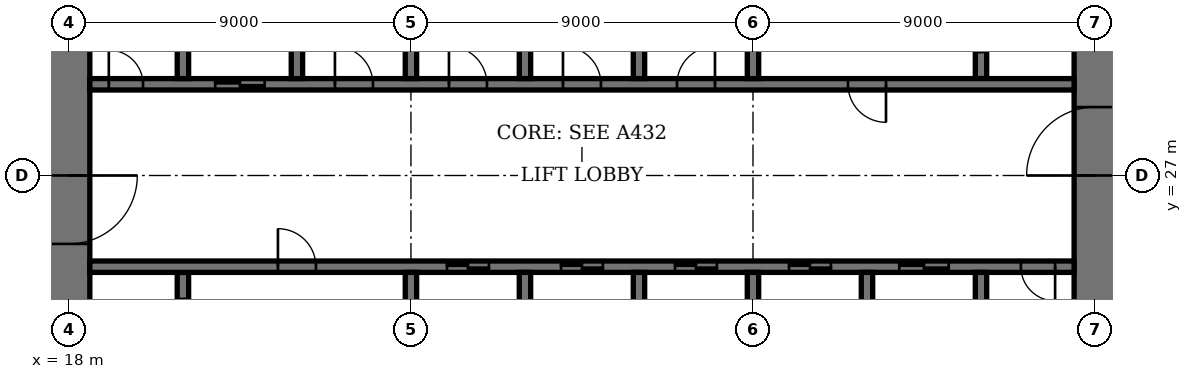
"""IFC4 building model, lengths in metres.
Left out: names, types, materials, properties, quantities, classifications, styles, units other than length and angle.
Written with IfcOpenShell. Run it as: python <this file> out.ifc"""

import sys

from ifc_helpers import new_model, si_unit, direction, frame, frame_2d, origin, place, context, subcontext, project, spatial, rectangle, extrude, element, fill, save


model = new_model("IFC4")
c1 = context("Model", 3, precision=1e-05, world=origin(), true_north=direction((0.0, 1.0)))
c2 = subcontext(c1, "Body", "Model", "MODEL_VIEW")
j1 = project(units=[si_unit("LENGTHUNIT", "METRE"), si_unit("PLANEANGLEUNIT", "RADIAN")], contexts=[c1])
p1 = place(None, origin())
s1 = spatial("IfcSite", under=j1, at=p1, CompositionType="ELEMENT")
p2 = place(p1, origin())
s2 = spatial("IfcBuilding", under=s1, at=p2, CompositionType="ELEMENT")
p3 = place(p2, frame((0.0, 0.0, 283.4)))
s3 = spatial("IfcBuildingStorey", under=s2, at=p3, CompositionType="ELEMENT", Elevation=283.4)
p4 = place(p3, frame((18.0, 35.45, 0.0), z_axis=(0.0, 0.0, 1.0), x_axis=(0.0, -1.0, 0.0)))
e1 = element("IfcWall", 1, at=p4, inside=s3, PredefinedType="SHEAR", context=c2, shape_type="SweptSolid", body=[
    extrude(rectangle(XDim=16.9, YDim=1.1, at=frame_2d((8.45, 0.0))), origin(), (0.0, 0.0, 1.0), 4.0),
])
p5 = place(p4, frame((8.45, 0.0, 0.0)))
e2 = element("IfcOpeningElement", 2, at=p5, cuts=e1, PredefinedType="OPENING", context=c2, shape_type="SweptSolid", body=[
    extrude(rectangle(XDim=1.8, YDim=2.4, at=frame_2d((0.9, 1.2))), frame((0.0, 0.56, 0.0), z_axis=(0.0, -1.0, 0.0), x_axis=(1.0, 0.0, 0.0)), (0.0, 0.0, 1.0), 1.12),
])
p6 = place(p3, frame((45.0, 18.55, 0.0), z_axis=(0.0, 0.0, 1.0), x_axis=(0.0, 1.0, 0.0)))
e3 = element("IfcWall", 3, at=p6, inside=s3, PredefinedType="SHEAR", context=c2, shape_type="SweptSolid", body=[
    extrude(rectangle(XDim=16.9, YDim=1.1, at=frame_2d((8.45, 0.0))), origin(), (0.0, 0.0, 1.0), 4.0),
])
p7 = place(p6, frame((8.45, 0.0, 0.0)))
e4 = element("IfcOpeningElement", 4, at=p7, cuts=e3, PredefinedType="OPENING", context=c2, shape_type="SweptSolid", body=[
    extrude(rectangle(XDim=1.8, YDim=2.4, at=frame_2d((0.9, 1.2))), frame((0.0, 0.56, 0.0), z_axis=(0.0, -1.0, 0.0), x_axis=(1.0, 0.0, 0.0)), (0.0, 0.0, 1.0), 1.12),
])
p8 = place(p3, frame((21.0, 21.95, 0.0), z_axis=(0.0, 0.0, 1.0), x_axis=(0.0, 1.0, 0.0)))
e5 = element("IfcWall", 5, at=p8, inside=s3, PredefinedType="SHEAR", context=c2, shape_type="SweptSolid", body=[
    extrude(rectangle(XDim=2.5, YDim=0.3, at=frame_2d((1.25, 0.0))), origin(), (0.0, 0.0, 1.0), 4.0),
])
p9 = place(p8, frame((0.7, 0.0, 0.0)))
e6 = element("IfcOpeningElement", 6, at=p9, cuts=e5, PredefinedType="OPENING", context=c2, shape_type="SweptSolid", body=[
    extrude(rectangle(XDim=1.1, YDim=2.4, at=frame_2d((0.55, 1.2))), frame((0.0, 0.16, 0.0), z_axis=(0.0, -1.0, 0.0), x_axis=(1.0, 0.0, 0.0)), (0.0, 0.0, 1.0), 0.32),
])
p10 = place(p3, frame((42.0, 29.55, 0.0), z_axis=(0.0, 0.0, 1.0), x_axis=(0.0, 1.0, 0.0)))
e7 = element("IfcWall", 7, at=p10, inside=s3, PredefinedType="SHEAR", context=c2, shape_type="SweptSolid", body=[
    extrude(rectangle(XDim=2.5, YDim=0.3, at=frame_2d((1.25, 0.0))), origin(), (0.0, 0.0, 1.0), 4.0),
])
p11 = place(p10, frame((0.7, 0.0, 0.0)))
e8 = element("IfcOpeningElement", 8, at=p11, cuts=e7, PredefinedType="OPENING", context=c2, shape_type="SweptSolid", body=[
    extrude(rectangle(XDim=1.1, YDim=2.4, at=frame_2d((0.55, 1.2))), frame((0.0, 0.16, 0.0), z_axis=(0.0, -1.0, 0.0), x_axis=(1.0, 0.0, 0.0)), (0.0, 0.0, 1.0), 0.32),
])
p12 = place(p3, frame((18.55, 24.6, 0.0), z_axis=(0.0, 0.0, 1.0), x_axis=(1.0, 0.0, 0.0)))
e9 = element("IfcWall", 9, at=p12, inside=s3, PredefinedType="SHEAR", context=c2, shape_type="SweptSolid", body=[
    extrude(rectangle(XDim=25.9, YDim=0.3, at=frame_2d((12.95, 0.0))), origin(), (0.0, 0.0, 1.0), 4.0),
])
p13 = place(p12, frame((4.95, 0.0, 0.0)))
e10 = element("IfcOpeningElement", 10, at=p13, cuts=e9, PredefinedType="OPENING", context=c2, shape_type="SweptSolid", body=[
    extrude(rectangle(XDim=1.0, YDim=2.4, at=frame_2d((0.5, 1.2))), frame((0.0, 0.16, 0.0), z_axis=(0.0, -1.0, 0.0), x_axis=(1.0, 0.0, 0.0)), (0.0, 0.0, 1.0), 0.32),
])
p14 = place(p12, frame((24.5, 0.0, 0.0)))
e11 = element("IfcOpeningElement", 11, at=p14, cuts=e9, PredefinedType="OPENING", context=c2, shape_type="SweptSolid", body=[
    extrude(rectangle(XDim=0.9, YDim=2.1, at=frame_2d((0.45, 1.05))), frame((0.0, 0.16, 0.0), z_axis=(0.0, -1.0, 0.0), x_axis=(1.0, 0.0, 0.0)), (0.0, 0.0, 1.0), 0.32),
])
p15 = place(p12, frame((9.4, 0.0, 0.0)))
e12 = element("IfcOpeningElement", 12, at=p15, cuts=e9, PredefinedType="OPENING", context=c2, shape_type="SweptSolid", body=[
    extrude(rectangle(XDim=1.1, YDim=2.4, at=frame_2d((0.55, 1.2))), frame((0.0, 0.16, 0.0), z_axis=(0.0, -1.0, 0.0), x_axis=(1.0, 0.0, 0.0)), (0.0, 0.0, 1.0), 0.32),
])
p16 = place(p12, frame((12.4, 0.0, 0.0)))
e13 = element("IfcOpeningElement", 13, at=p16, cuts=e9, PredefinedType="OPENING", context=c2, shape_type="SweptSolid", body=[
    extrude(rectangle(XDim=1.1, YDim=2.4, at=frame_2d((0.55, 1.2))), frame((0.0, 0.16, 0.0), z_axis=(0.0, -1.0, 0.0), x_axis=(1.0, 0.0, 0.0)), (0.0, 0.0, 1.0), 0.32),
])
p17 = place(p12, frame((15.4, 0.0, 0.0)))
e14 = element("IfcOpeningElement", 14, at=p17, cuts=e9, PredefinedType="OPENING", context=c2, shape_type="SweptSolid", body=[
    extrude(rectangle(XDim=1.1, YDim=2.4, at=frame_2d((0.55, 1.2))), frame((0.0, 0.16, 0.0), z_axis=(0.0, -1.0, 0.0), x_axis=(1.0, 0.0, 0.0)), (0.0, 0.0, 1.0), 0.32),
])
p18 = place(p12, frame((18.4, 0.0, 0.0)))
e15 = element("IfcOpeningElement", 15, at=p18, cuts=e9, PredefinedType="OPENING", context=c2, shape_type="SweptSolid", body=[
    extrude(rectangle(XDim=1.1, YDim=2.4, at=frame_2d((0.55, 1.2))), frame((0.0, 0.16, 0.0), z_axis=(0.0, -1.0, 0.0), x_axis=(1.0, 0.0, 0.0)), (0.0, 0.0, 1.0), 0.32),
])
p19 = place(p12, frame((21.3, 0.0, 0.0)))
e16 = element("IfcOpeningElement", 16, at=p19, cuts=e9, PredefinedType="OPENING", context=c2, shape_type="SweptSolid", body=[
    extrude(rectangle(XDim=1.3, YDim=2.4, at=frame_2d((0.65, 1.2))), frame((0.0, 0.16, 0.0), z_axis=(0.0, -1.0, 0.0), x_axis=(1.0, 0.0, 0.0)), (0.0, 0.0, 1.0), 0.32),
])
p20 = place(p3, frame((18.55, 29.4, 0.0), z_axis=(0.0, 0.0, 1.0), x_axis=(1.0, 0.0, 0.0)))
e17 = element("IfcWall", 17, at=p20, inside=s3, PredefinedType="SHEAR", context=c2, shape_type="SweptSolid", body=[
    extrude(rectangle(XDim=25.9, YDim=0.3, at=frame_2d((12.95, 0.0))), origin(), (0.0, 0.0, 1.0), 4.0),
])
p21 = place(p20, frame((19.95, 0.0, 0.0)))
e18 = element("IfcOpeningElement", 18, at=p21, cuts=e17, PredefinedType="OPENING", context=c2, shape_type="SweptSolid", body=[
    extrude(rectangle(XDim=1.0, YDim=2.4, at=frame_2d((0.5, 1.2))), frame((0.0, 0.16, 0.0), z_axis=(0.0, -1.0, 0.0), x_axis=(1.0, 0.0, 0.0)), (0.0, 0.0, 1.0), 0.32),
])
p22 = place(p20, frame((0.5, 0.0, 0.0)))
e19 = element("IfcOpeningElement", 19, at=p22, cuts=e17, PredefinedType="OPENING", context=c2, shape_type="SweptSolid", body=[
    extrude(rectangle(XDim=0.9, YDim=2.1, at=frame_2d((0.45, 1.05))), frame((0.0, 0.16, 0.0), z_axis=(0.0, -1.0, 0.0), x_axis=(1.0, 0.0, 0.0)), (0.0, 0.0, 1.0), 0.32),
])
p23 = place(p20, frame((15.45, 0.0, 0.0)))
e20 = element("IfcOpeningElement", 20, at=p23, cuts=e17, PredefinedType="OPENING", context=c2, shape_type="SweptSolid", body=[
    extrude(rectangle(XDim=1.0, YDim=2.4, at=frame_2d((0.5, 1.2))), frame((0.0, 0.16, 0.0), z_axis=(0.0, -1.0, 0.0), x_axis=(1.0, 0.0, 0.0)), (0.0, 0.0, 1.0), 0.32),
])
p24 = place(p20, frame((12.45, 0.0, 0.0)))
e21 = element("IfcOpeningElement", 21, at=p24, cuts=e17, PredefinedType="OPENING", context=c2, shape_type="SweptSolid", body=[
    extrude(rectangle(XDim=1.0, YDim=2.4, at=frame_2d((0.5, 1.2))), frame((0.0, 0.16, 0.0), z_axis=(0.0, -1.0, 0.0), x_axis=(1.0, 0.0, 0.0)), (0.0, 0.0, 1.0), 0.32),
])
p25 = place(p20, frame((9.45, 0.0, 0.0)))
e22 = element("IfcOpeningElement", 22, at=p25, cuts=e17, PredefinedType="OPENING", context=c2, shape_type="SweptSolid", body=[
    extrude(rectangle(XDim=1.0, YDim=2.4, at=frame_2d((0.5, 1.2))), frame((0.0, 0.16, 0.0), z_axis=(0.0, -1.0, 0.0), x_axis=(1.0, 0.0, 0.0)), (0.0, 0.0, 1.0), 0.32),
])
p26 = place(p20, frame((6.45, 0.0, 0.0)))
e23 = element("IfcOpeningElement", 23, at=p26, cuts=e17, PredefinedType="OPENING", context=c2, shape_type="SweptSolid", body=[
    extrude(rectangle(XDim=1.0, YDim=2.4, at=frame_2d((0.5, 1.2))), frame((0.0, 0.16, 0.0), z_axis=(0.0, -1.0, 0.0), x_axis=(1.0, 0.0, 0.0)), (0.0, 0.0, 1.0), 0.32),
])
p27 = place(p20, frame((3.3, 0.0, 0.0)))
e24 = element("IfcOpeningElement", 24, at=p27, cuts=e17, PredefinedType="OPENING", context=c2, shape_type="SweptSolid", body=[
    extrude(rectangle(XDim=1.3, YDim=2.4, at=frame_2d((0.65, 1.2))), frame((0.0, 0.16, 0.0), z_axis=(0.0, -1.0, 0.0), x_axis=(1.0, 0.0, 0.0)), (0.0, 0.0, 1.0), 0.32),
])
for number, where, z_axis, x_axis in (
    (25, (30.0, 21.75, 0.0), (0.0, 0.0, 1.0), (0.0, 1.0, 0.0)),
    (26, (33.0, 29.55, 0.0), (0.0, 0.0, 1.0), (0.0, 1.0, 0.0)),
    (27, (33.0, 21.75, 0.0), (0.0, 0.0, 1.0), (0.0, 1.0, 0.0)),
    (28, (30.0, 29.55, 0.0), (0.0, 0.0, 1.0), (0.0, 1.0, 0.0)),
    (29, (36.0, 21.75, 0.0), (0.0, 0.0, 1.0), (0.0, 1.0, 0.0)),
    (30, (27.0, 29.55, 0.0), (0.0, 0.0, 1.0), (0.0, 1.0, 0.0)),
):
    element("IfcWall", number, at=place(p3, frame(where, z_axis=z_axis, x_axis=x_axis)), inside=s3, PredefinedType="SHEAR", context=c2, shape_type="SweptSolid", body=[
        extrude(rectangle(XDim=2.7, YDim=0.3, at=frame_2d((1.35, 0.0))), origin(), (0.0, 0.0, 1.0), 4.0),
    ])
for number, where, z_axis, x_axis in (
    (31, (39.0, 18.55, 0.0), (0.0, 0.0, 1.0), (0.0, 1.0, 0.0)),
    (32, (24.0, 29.55, 0.0), (0.0, 0.0, 1.0), (0.0, 1.0, 0.0)),
):
    element("IfcWall", number, at=place(p3, frame(where, z_axis=z_axis, x_axis=x_axis)), inside=s3, PredefinedType="SHEAR", context=c2, shape_type="SweptSolid", body=[
        extrude(rectangle(XDim=5.9, YDim=0.3, at=frame_2d((2.95, 0.0))), origin(), (0.0, 0.0, 1.0), 4.0),
    ])
for number, where, z_axis, x_axis in (
    (33, (42.0, 21.75, 0.0), (0.0, 0.0, 1.0), (0.0, 1.0, 0.0)),
    (34, (21.0, 29.55, 0.0), (0.0, 0.0, 1.0), (0.0, 1.0, 0.0)),
):
    element("IfcWall", number, at=place(p3, frame(where, z_axis=z_axis, x_axis=x_axis)), inside=s3, PredefinedType="SHEAR", context=c2, shape_type="SweptSolid", body=[
        extrude(rectangle(XDim=2.7, YDim=0.3, at=frame_2d((1.35, 0.0))), origin(), (0.0, 0.0, 1.0), 4.0),
    ])
for number, where, z_axis, x_axis in (
    (35, (27.0, 21.6, 0.0), (0.0, 0.0, 1.0), (0.0, 1.0, 0.0)),
    (36, (36.0, 29.55, 0.0), (0.0, 0.0, 1.0), (0.0, 1.0, 0.0)),
):
    element("IfcWall", number, at=place(p3, frame(where, z_axis=z_axis, x_axis=x_axis)), inside=s3, PredefinedType="SHEAR", context=c2, shape_type="SweptSolid", body=[
        extrude(rectangle(XDim=2.85, YDim=0.3, at=frame_2d((1.425, 0.0))), origin(), (0.0, 0.0, 1.0), 4.0),
    ])
p28 = place(p5, origin())
e37 = element("IfcDoor", 37, at=p28, inside=s3, OperationType="DOUBLE_DOOR_DOUBLE_SWING", PredefinedType="DOOR", context=c2, shape_type="SweptSolid", body=[
    extrude(rectangle(XDim=1.8, YDim=2.4, at=frame_2d((0.9, 1.2))), frame((0.0, 0.03, 0.0), z_axis=(0.0, -1.0, 0.0), x_axis=(1.0, 0.0, 0.0)), (0.0, 0.0, 1.0), 0.06),
    extrude(rectangle(XDim=0.04, YDim=2.4, at=frame_2d((0.02, 1.2))), frame((0.0, 0.55, 0.0), z_axis=(0.0, -1.0, 0.0), x_axis=(1.0, 0.0, 0.0)), (0.0, 0.0, 1.0), 1.1),
    extrude(rectangle(XDim=0.04, YDim=2.4, at=frame_2d((1.78, 1.2))), frame((0.0, 0.55, 0.0), z_axis=(0.0, -1.0, 0.0), x_axis=(1.0, 0.0, 0.0)), (0.0, 0.0, 1.0), 1.1),
    extrude(rectangle(XDim=1.8, YDim=0.04, at=frame_2d((0.9, 2.38))), frame((0.0, 0.55, 0.0), z_axis=(0.0, -1.0, 0.0), x_axis=(1.0, 0.0, 0.0)), (0.0, 0.0, 1.0), 1.1),
])
fill(e2, e37)
p29 = place(p7, origin())
e38 = element("IfcDoor", 38, at=p29, inside=s3, OperationType="DOUBLE_DOOR_DOUBLE_SWING", PredefinedType="DOOR", context=c2, shape_type="SweptSolid", body=[
    extrude(rectangle(XDim=1.8, YDim=2.4, at=frame_2d((0.9, 1.2))), frame((0.0, 0.03, 0.0), z_axis=(0.0, -1.0, 0.0), x_axis=(1.0, 0.0, 0.0)), (0.0, 0.0, 1.0), 0.06),
    extrude(rectangle(XDim=0.04, YDim=2.4, at=frame_2d((0.02, 1.2))), frame((0.0, 0.55, 0.0), z_axis=(0.0, -1.0, 0.0), x_axis=(1.0, 0.0, 0.0)), (0.0, 0.0, 1.0), 1.1),
    extrude(rectangle(XDim=0.04, YDim=2.4, at=frame_2d((1.78, 1.2))), frame((0.0, 0.55, 0.0), z_axis=(0.0, -1.0, 0.0), x_axis=(1.0, 0.0, 0.0)), (0.0, 0.0, 1.0), 1.1),
    extrude(rectangle(XDim=1.8, YDim=0.04, at=frame_2d((0.9, 2.38))), frame((0.0, 0.55, 0.0), z_axis=(0.0, -1.0, 0.0), x_axis=(1.0, 0.0, 0.0)), (0.0, 0.0, 1.0), 1.1),
])
fill(e4, e38)
p30 = place(p13, origin())
e39 = element("IfcDoor", 39, at=p30, inside=s3, OperationType="SINGLE_SWING_RIGHT", PredefinedType="DOOR", context=c2, shape_type="SweptSolid", body=[
    extrude(rectangle(XDim=1.0, YDim=2.4, at=frame_2d((0.5, 1.2))), frame((0.0, 0.03, 0.0), z_axis=(0.0, -1.0, 0.0), x_axis=(1.0, 0.0, 0.0)), (0.0, 0.0, 1.0), 0.06),
])
fill(e10, e39)
p31 = place(p21, origin())
e40 = element("IfcDoor", 40, at=p31, inside=s3, OperationType="SINGLE_SWING_RIGHT", PredefinedType="DOOR", context=c2, shape_type="SweptSolid", body=[
    extrude(rectangle(XDim=1.0, YDim=2.4, at=frame_2d((0.5, 1.2))), frame((0.0, 0.03, 0.0), z_axis=(0.0, -1.0, 0.0), x_axis=(1.0, 0.0, 0.0)), (0.0, 0.0, 1.0), 0.06),
])
fill(e18, e40)
p32 = place(p14, origin())
e41 = element("IfcDoor", 41, at=p32, inside=s3, OperationType="SINGLE_SWING_RIGHT", PredefinedType="DOOR", context=c2, shape_type="SweptSolid", body=[
    extrude(rectangle(XDim=0.9, YDim=2.1, at=frame_2d((0.45, 1.05))), frame((0.0, 0.03, 0.0), z_axis=(0.0, -1.0, 0.0), x_axis=(1.0, 0.0, 0.0)), (0.0, 0.0, 1.0), 0.06),
])
fill(e11, e41)
p33 = place(p22, origin())
e42 = element("IfcDoor", 42, at=p33, inside=s3, OperationType="SINGLE_SWING_RIGHT", PredefinedType="DOOR", context=c2, shape_type="SweptSolid", body=[
    extrude(rectangle(XDim=0.9, YDim=2.1, at=frame_2d((0.45, 1.05))), frame((0.0, 0.03, 0.0), z_axis=(0.0, -1.0, 0.0), x_axis=(1.0, 0.0, 0.0)), (0.0, 0.0, 1.0), 0.06),
])
fill(e19, e42)
p34 = place(p15, origin())
e43 = element("IfcDoor", 43, at=p34, inside=s3, OperationType="DOUBLE_DOOR_SLIDING", PredefinedType="DOOR", context=c2, shape_type="SweptSolid", body=[
    extrude(rectangle(XDim=1.1, YDim=2.4, at=frame_2d((0.55, 1.2))), frame((0.0, 0.02, 0.0), z_axis=(0.0, -1.0, 0.0), x_axis=(1.0, 0.0, 0.0)), (0.0, 0.0, 1.0), 0.04),
])
fill(e12, e43)
p35 = place(p16, origin())
e44 = element("IfcDoor", 44, at=p35, inside=s3, OperationType="DOUBLE_DOOR_SLIDING", PredefinedType="DOOR", context=c2, shape_type="SweptSolid", body=[
    extrude(rectangle(XDim=1.1, YDim=2.4, at=frame_2d((0.55, 1.2))), frame((0.0, 0.02, 0.0), z_axis=(0.0, -1.0, 0.0), x_axis=(1.0, 0.0, 0.0)), (0.0, 0.0, 1.0), 0.04),
])
fill(e13, e44)
p36 = place(p17, origin())
e45 = element("IfcDoor", 45, at=p36, inside=s3, OperationType="DOUBLE_DOOR_SLIDING", PredefinedType="DOOR", context=c2, shape_type="SweptSolid", body=[
    extrude(rectangle(XDim=1.1, YDim=2.4, at=frame_2d((0.55, 1.2))), frame((0.0, 0.02, 0.0), z_axis=(0.0, -1.0, 0.0), x_axis=(1.0, 0.0, 0.0)), (0.0, 0.0, 1.0), 0.04),
])
fill(e14, e45)
p37 = place(p18, origin())
e46 = element("IfcDoor", 46, at=p37, inside=s3, OperationType="DOUBLE_DOOR_SLIDING", PredefinedType="DOOR", context=c2, shape_type="SweptSolid", body=[
    extrude(rectangle(XDim=1.1, YDim=2.4, at=frame_2d((0.55, 1.2))), frame((0.0, 0.02, 0.0), z_axis=(0.0, -1.0, 0.0), x_axis=(1.0, 0.0, 0.0)), (0.0, 0.0, 1.0), 0.04),
])
fill(e15, e46)
p38 = place(p23, origin())
e47 = element("IfcDoor", 47, at=p38, inside=s3, OperationType="SINGLE_SWING_LEFT", PredefinedType="DOOR", context=c2, shape_type="SweptSolid", body=[
    extrude(rectangle(XDim=1.0, YDim=2.4, at=frame_2d((0.5, 1.2))), frame((0.0, 0.03, 0.0), z_axis=(0.0, -1.0, 0.0), x_axis=(1.0, 0.0, 0.0)), (0.0, 0.0, 1.0), 0.06),
])
fill(e20, e47)
p39 = place(p24, origin())
e48 = element("IfcDoor", 48, at=p39, inside=s3, OperationType="SINGLE_SWING_RIGHT", PredefinedType="DOOR", context=c2, shape_type="SweptSolid", body=[
    extrude(rectangle(XDim=1.0, YDim=2.4, at=frame_2d((0.5, 1.2))), frame((0.0, 0.03, 0.0), z_axis=(0.0, -1.0, 0.0), x_axis=(1.0, 0.0, 0.0)), (0.0, 0.0, 1.0), 0.06),
])
fill(e21, e48)
p40 = place(p25, origin())
e49 = element("IfcDoor", 49, at=p40, inside=s3, OperationType="SINGLE_SWING_RIGHT", PredefinedType="DOOR", context=c2, shape_type="SweptSolid", body=[
    extrude(rectangle(XDim=1.0, YDim=2.4, at=frame_2d((0.5, 1.2))), frame((0.0, 0.03, 0.0), z_axis=(0.0, -1.0, 0.0), x_axis=(1.0, 0.0, 0.0)), (0.0, 0.0, 1.0), 0.06),
])
fill(e22, e49)
p41 = place(p26, origin())
e50 = element("IfcDoor", 50, at=p41, inside=s3, OperationType="SINGLE_SWING_RIGHT", PredefinedType="DOOR", context=c2, shape_type="SweptSolid", body=[
    extrude(rectangle(XDim=1.0, YDim=2.4, at=frame_2d((0.5, 1.2))), frame((0.0, 0.03, 0.0), z_axis=(0.0, -1.0, 0.0), x_axis=(1.0, 0.0, 0.0)), (0.0, 0.0, 1.0), 0.06),
])
fill(e23, e50)
p42 = place(p19, origin())
e51 = element("IfcDoor", 51, at=p42, inside=s3, OperationType="DOUBLE_DOOR_SLIDING", PredefinedType="DOOR", context=c2, shape_type="SweptSolid", body=[
    extrude(rectangle(XDim=1.3, YDim=2.4, at=frame_2d((0.65, 1.2))), frame((0.0, 0.02, 0.0), z_axis=(0.0, -1.0, 0.0), x_axis=(1.0, 0.0, 0.0)), (0.0, 0.0, 1.0), 0.04),
])
fill(e16, e51)
p43 = place(p27, origin())
e52 = element("IfcDoor", 52, at=p43, inside=s3, OperationType="DOUBLE_DOOR_SLIDING", PredefinedType="DOOR", context=c2, shape_type="SweptSolid", body=[
    extrude(rectangle(XDim=1.3, YDim=2.4, at=frame_2d((0.65, 1.2))), frame((0.0, 0.02, 0.0), z_axis=(0.0, -1.0, 0.0), x_axis=(1.0, 0.0, 0.0)), (0.0, 0.0, 1.0), 0.04),
])
fill(e24, e52)
save(model, sys.argv[1])
